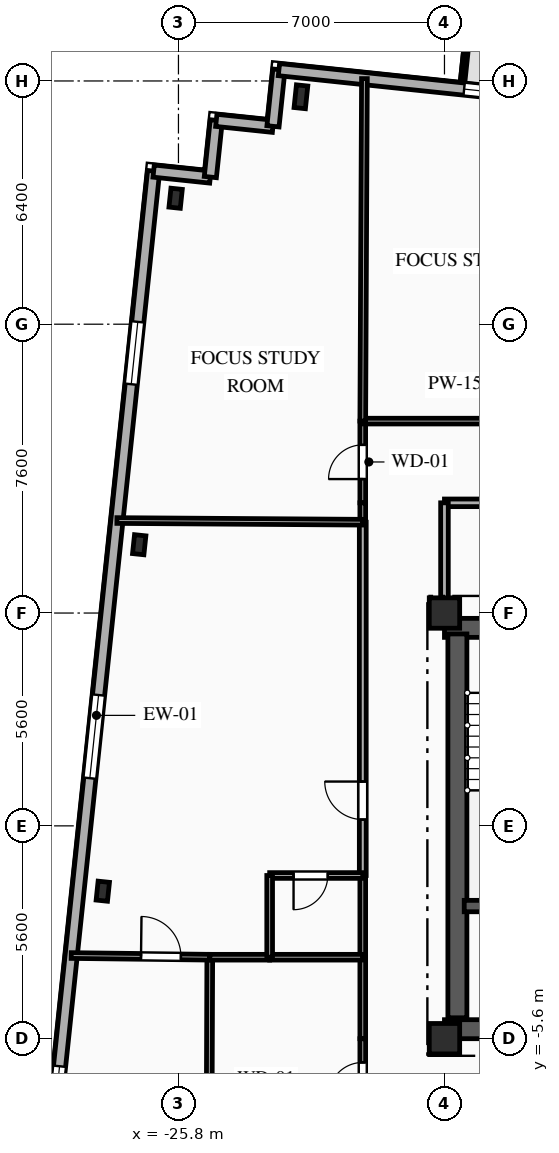
"""IFC4 building model, lengths in metres.
Left out: names, types, materials, properties, quantities, classifications, styles, units other than length and angle.
Written with IfcOpenShell. Run it as: python <this file> out.ifc"""

import sys

from ifc_helpers import new_model, si_unit, direction, frame, frame_2d, origin, origin_2d, place, context, subcontext, project, spatial, rectangle, i_section, extrude, element, fill, save


model = new_model("IFC4")
c1 = context("Model", 3, precision=1e-05, world=origin(), true_north=direction((0.0, 1.0)))
c2 = subcontext(c1, "Body", "Model", "MODEL_VIEW")
j1 = project(units=[si_unit("LENGTHUNIT", "METRE"), si_unit("PLANEANGLEUNIT", "RADIAN")], contexts=[c1])
p1 = place(None, origin())
s1 = spatial("IfcSite", under=j1, at=p1, CompositionType="ELEMENT")
p2 = place(p1, origin())
s2 = spatial("IfcBuilding", under=s1, at=p2, CompositionType="ELEMENT")
p3 = place(p2, frame((0.0, 0.0, 219.85)))
s3 = spatial("IfcBuildingStorey", under=s2, at=p3, CompositionType="ELEMENT", Elevation=219.85)
for number, where, z_axis, x_axis in (
    (1, (-18.8, -5.6, 0.0), (0.0, 0.0, 1.0), (1.0, 0.0, 0.0)),
    (2, (-18.8, 5.6, 0.0), (0.0, 0.0, 1.0), (1.0, 0.0, 0.0)),
):
    element("IfcColumn", number, at=place(p3, frame(where, z_axis=z_axis, x_axis=x_axis)), inside=s3, PredefinedType="COLUMN", context=c2, shape_type="SweptSolid", body=[
        extrude(rectangle(XDim=0.8, YDim=0.8, at=origin_2d()), origin(), (0.0, 0.0, 1.0), 3.35),
    ])
p4 = place(p3, frame((-22.577, 19.184, 0.0), z_axis=(0.0, 0.0, 1.0), x_axis=(0.994521895368, -0.104528463268, 0.0)))
e3 = element("IfcColumn", 3, at=p4, inside=s3, PredefinedType="COLUMN", context=c2, shape_type="SweptSolid", body=[
    extrude(i_section(OverallWidth=0.3, OverallDepth=0.6, WebThickness=0.015, FlangeThickness=0.03, FilletRadius=0.027, at=origin_2d()), origin(), (0.0, 0.0, 1.0), 3.35),
])
for number, where, z_axis, x_axis in (
    (4, (-25.875, 16.514, 0.0), (0.0, 0.0, 1.0), (0.995, -0.105, 0.0)),
    (5, (-26.833, 7.398, 0.0), (0.0, 0.0, 1.0), (0.995, -0.105, 0.0)),
    (6, (-27.791, -1.719, 0.0), (0.0, 0.0, 1.0), (0.995, -0.105, 0.0)),
):
    element("IfcColumn", number, at=place(p3, frame(where, z_axis=z_axis, x_axis=x_axis)), inside=s3, PredefinedType="COLUMN", context=c2, shape_type="SweptSolid", body=[
        extrude(i_section(OverallWidth=0.3, OverallDepth=0.5, WebThickness=0.014, FlangeThickness=0.028, FilletRadius=0.027, at=origin_2d()), origin(), (0.0, 0.0, 1.0), 3.35),
    ])
p5 = place(p3, frame((-29.463, -11.414, 0.0), z_axis=(0.0, 0.0, 1.0), x_axis=(0.104530779244, 0.994521651947, 0.0)))
e7 = element("IfcWall", 7, at=p5, inside=s3, PredefinedType="SOLIDWALL", context=c2, shape_type="SweptSolid", body=[
    extrude(rectangle(XDim=28.8, YDim=0.32, at=frame_2d((14.4, 0.0))), origin(), (0.0, 0.0, 1.0), 3.0),
])
p6 = place(p5, frame((3.467, 0.0, 0.85)))
e8 = element("IfcOpeningElement", 8, at=p6, cuts=e7, PredefinedType="OPENING", context=c2, shape_type="SweptSolid", body=[
    extrude(rectangle(XDim=1.65, YDim=1.85, at=frame_2d((0.825, 0.925))), frame((0.0, 0.17, 0.0), z_axis=(0.0, -1.0, 0.0), x_axis=(1.0, 0.0, 0.0)), (0.0, 0.0, 1.0), 0.34),
])
p7 = place(p5, frame((12.738, 0.0, 0.85)))
e9 = element("IfcOpeningElement", 9, at=p7, cuts=e7, PredefinedType="OPENING", context=c2, shape_type="SweptSolid", body=[
    extrude(rectangle(XDim=2.2, YDim=1.85, at=frame_2d((1.1, 0.925))), frame((0.0, 0.17, 0.0), z_axis=(0.0, -1.0, 0.0), x_axis=(1.0, 0.0, 0.0)), (0.0, 0.0, 1.0), 0.34),
])
p8 = place(p5, frame((23.162, 0.0, 0.85)))
e10 = element("IfcOpeningElement", 10, at=p8, cuts=e7, PredefinedType="OPENING", context=c2, shape_type="SweptSolid", body=[
    extrude(rectangle(XDim=1.65, YDim=1.85, at=frame_2d((0.825, 0.925))), frame((0.0, 0.17, 0.0), z_axis=(0.0, -1.0, 0.0), x_axis=(1.0, 0.0, 0.0)), (0.0, 0.0, 1.0), 0.34),
])
p9 = place(p3, frame((-26.453, 17.229, 0.0), z_axis=(0.0, 0.0, 1.0), x_axis=(0.994508128223, -0.104659366031, 0.0)))
e11 = element("IfcWall", 11, at=p9, inside=s3, PredefinedType="SOLIDWALL", context=c2, shape_type="SweptSolid", body=[
    extrude(rectangle(XDim=1.5, YDim=0.32, at=frame_2d((0.75, 0.0))), origin(), (0.0, 0.0, 1.0), 3.0),
])
p10 = place(p3, frame((-24.961, 17.072, 0.0), z_axis=(0.0, 0.0, 1.0), x_axis=(0.104642427191, 0.994509910675, 0.0)))
e12 = element("IfcWall", 12, at=p10, inside=s3, PredefinedType="SOLIDWALL", context=c2, shape_type="SweptSolid", body=[
    extrude(rectangle(XDim=1.5, YDim=0.32, at=frame_2d((0.75, 0.0))), origin(), (0.0, 0.0, 1.0), 3.0),
])
p11 = place(p3, frame((-24.804, 18.563, 0.0), z_axis=(0.0, 0.0, 1.0), x_axis=(0.994508128223, -0.104659366031, 0.0)))
e13 = element("IfcWall", 13, at=p11, inside=s3, PredefinedType="SOLIDWALL", context=c2, shape_type="SweptSolid", body=[
    extrude(rectangle(XDim=1.5, YDim=0.32, at=frame_2d((0.75, 0.0))), origin(), (0.0, 0.0, 1.0), 3.0),
])
p12 = place(p3, frame((-23.312, 18.406, 0.0), z_axis=(0.0, 0.0, 1.0), x_axis=(0.104481464157, 0.994526834051, 0.0)))
e14 = element("IfcWall", 14, at=p12, inside=s3, PredefinedType="SOLIDWALL", context=c2, shape_type="SweptSolid", body=[
    extrude(rectangle(XDim=1.5, YDim=0.32, at=frame_2d((0.75, 0.0))), origin(), (0.0, 0.0, 1.0), 3.0),
])
p13 = place(p3, frame((-23.156, 19.898, 0.0), z_axis=(0.0, 0.0, 1.0), x_axis=(0.994522001802, -0.104527450613, 0.0)))
e15 = element("IfcWall", 15, at=p13, inside=s3, PredefinedType="SOLIDWALL", context=c2, shape_type="SweptSolid", body=[
    extrude(rectangle(XDim=45.8, YDim=0.32, at=frame_2d((22.9, 0.0))), origin(), (0.0, 0.0, 1.0), 3.0),
])
p14 = place(p13, frame((4.9, 0.0, 0.85)))
e16 = element("IfcOpeningElement", 16, at=p14, cuts=e15, PredefinedType="OPENING", context=c2, shape_type="SweptSolid", body=[
    extrude(rectangle(XDim=1.65, YDim=1.85, at=frame_2d((0.825, 0.925))), frame((0.0, 0.17, 0.0), z_axis=(0.0, -1.0, 0.0), x_axis=(1.0, 0.0, 0.0)), (0.0, 0.0, 1.0), 0.34),
])
p15 = place(p13, frame((11.706, 0.0, 0.85)))
e17 = element("IfcOpeningElement", 17, at=p15, cuts=e15, PredefinedType="OPENING", context=c2, shape_type="SweptSolid", body=[
    extrude(rectangle(XDim=1.65, YDim=1.85, at=frame_2d((0.825, 0.925))), frame((0.0, 0.17, 0.0), z_axis=(0.0, -1.0, 0.0), x_axis=(1.0, 0.0, 0.0)), (0.0, 0.0, 1.0), 0.34),
])
p16 = place(p13, frame((23.431, 0.0, 0.85)))
e18 = element("IfcOpeningElement", 18, at=p16, cuts=e15, PredefinedType="OPENING", context=c2, shape_type="SweptSolid", body=[
    extrude(rectangle(XDim=1.5, YDim=1.85, at=frame_2d((0.75, 0.925))), frame((0.0, 0.17, 0.0), z_axis=(0.0, -1.0, 0.0), x_axis=(1.0, 0.0, 0.0)), (0.0, 0.0, 1.0), 0.34),
])
p17 = place(p13, frame((34.628, 0.0, 0.85)))
e19 = element("IfcOpeningElement", 19, at=p17, cuts=e15, PredefinedType="OPENING", context=c2, shape_type="SweptSolid", body=[
    extrude(rectangle(XDim=1.65, YDim=1.85, at=frame_2d((0.825, 0.925))), frame((0.0, 0.17, 0.0), z_axis=(0.0, -1.0, 0.0), x_axis=(1.0, 0.0, 0.0)), (0.0, 0.0, 1.0), 0.34),
])
p18 = place(p3, frame((-18.8, 5.21, 0.0), z_axis=(0.0, 0.0, 1.0), x_axis=(1.0, 0.0, 0.0)))
e20 = element("IfcWall", 20, at=p18, inside=s3, PredefinedType="SHEAR", context=c2, shape_type="SweptSolid", body=[
    extrude(rectangle(XDim=9.6, YDim=0.5, at=frame_2d((4.8, 0.0))), origin(), (0.0, 0.0, 1.0), 3.0),
])
p19 = place(p18, frame((1.55, 0.0, 0.0)))
e21 = element("IfcOpeningElement", 21, at=p19, cuts=e20, PredefinedType="OPENING", context=c2, shape_type="SweptSolid", body=[
    extrude(rectangle(XDim=1.1, YDim=2.15, at=frame_2d((0.55, 1.075))), frame((0.0, 0.26, 0.0), z_axis=(0.0, -1.0, 0.0), x_axis=(1.0, 0.0, 0.0)), (0.0, 0.0, 1.0), 0.52),
])
p20 = place(p18, frame((4.775, 0.0, 0.0)))
e22 = element("IfcOpeningElement", 22, at=p20, cuts=e20, PredefinedType="OPENING", context=c2, shape_type="SweptSolid", body=[
    extrude(rectangle(XDim=1.05, YDim=2.1, at=frame_2d((0.525, 1.05))), frame((0.0, 0.26, 0.0), z_axis=(0.0, -1.0, 0.0), x_axis=(1.0, 0.0, 0.0)), (0.0, 0.0, 1.0), 0.52),
])
p21 = place(p3, frame((-18.8, -5.35, 0.0), z_axis=(0.0, 0.0, 1.0), x_axis=(1.0, 0.0, 0.0)))
e23 = element("IfcWall", 23, at=p21, inside=s3, PredefinedType="SHEAR", context=c2, shape_type="SweptSolid", body=[
    extrude(rectangle(XDim=9.6, YDim=0.5, at=frame_2d((4.8, 0.0))), origin(), (0.0, 0.0, 1.0), 3.0),
])
p22 = place(p21, frame((1.05, 0.0, 0.0)))
e24 = element("IfcOpeningElement", 24, at=p22, cuts=e23, PredefinedType="OPENING", context=c2, shape_type="SweptSolid", body=[
    extrude(rectangle(XDim=0.9, YDim=2.1, at=frame_2d((0.45, 1.05))), frame((0.0, 0.26, 0.0), z_axis=(0.0, -1.0, 0.0), x_axis=(1.0, 0.0, 0.0)), (0.0, 0.0, 1.0), 0.52),
])
p23 = place(p3, frame((-18.46, -5.05, 0.0), z_axis=(0.0, 0.0, 1.0), x_axis=(0.0, 1.0, 0.0)))
e25 = element("IfcWall", 25, at=p23, inside=s3, PredefinedType="SHEAR", context=c2, shape_type="SweptSolid", body=[
    extrude(rectangle(XDim=10.1, YDim=0.5, at=frame_2d((5.05, 0.0))), origin(), (0.0, 0.0, 1.0), 3.0),
])
p24 = place(p3, frame((-18.28, -2.11, 0.0), z_axis=(0.0, 0.0, 1.0), x_axis=(1.0, 0.0, 0.0)))
e26 = element("IfcWall", 26, at=p24, inside=s3, PredefinedType="SHEAR", context=c2, shape_type="SweptSolid", body=[
    extrude(rectangle(XDim=3.18, YDim=0.3, at=frame_2d((1.59, 0.0))), origin(), (0.0, 0.0, 1.0), 3.0),
])
p25 = place(p3, frame((-12.0, 8.5, 0.0), z_axis=(0.0, 0.0, 1.0), x_axis=(-1.0, 0.0, 0.0)))
e27 = element("IfcWall", 27, at=p25, inside=s3, PredefinedType="PARTITIONING", context=c2, shape_type="SweptSolid", body=[
    extrude(rectangle(XDim=6.8, YDim=0.2, at=frame_2d((3.4, 0.0))), origin(), (0.0, 0.0, 1.0), 3.0),
])
p26 = place(p25, frame((1.715, 0.0, 0.0)))
e28 = element("IfcOpeningElement", 28, at=p26, cuts=e27, PredefinedType="OPENING", context=c2, shape_type="SweptSolid", body=[
    extrude(rectangle(XDim=1.1, YDim=2.15, at=frame_2d((0.55, 1.075))), frame((0.0, 0.11, 0.0), z_axis=(0.0, -1.0, 0.0), x_axis=(1.0, 0.0, 0.0)), (0.0, 0.0, 1.0), 0.22),
])
p27 = place(p3, frame((-18.8, 8.5, 0.0), z_axis=(0.0, 0.0, 1.0), x_axis=(0.0, -1.0, 0.0)))
e29 = element("IfcWall", 29, at=p27, inside=s3, PredefinedType="PARTITIONING", context=c2, shape_type="SweptSolid", body=[
    extrude(rectangle(XDim=2.9, YDim=0.2, at=frame_2d((1.45, 0.0))), origin(), (0.0, 0.0, 1.0), 2.625),
])
p28 = place(p3, frame((-20.95, 8.5, 0.0), z_axis=(0.0, 0.0, 1.0), x_axis=(0.0, 1.0, 0.0)))
e30 = element("IfcWall", 30, at=p28, inside=s3, PredefinedType="PARTITIONING", context=c2, shape_type="SweptSolid", body=[
    extrude(rectangle(XDim=2.15, YDim=0.15, at=frame_2d((1.075, 0.0))), origin(), (0.0, 0.0, 1.0), 3.0),
])
p29 = place(p28, frame((0.625, 0.0, 0.0)))
e31 = element("IfcOpeningElement", 31, at=p29, cuts=e30, PredefinedType="OPENING", context=c2, shape_type="SweptSolid", body=[
    extrude(rectangle(XDim=0.9, YDim=2.1, at=frame_2d((0.45, 1.05))), frame((0.0, 0.085, 0.0), z_axis=(0.0, -1.0, 0.0), x_axis=(1.0, 0.0, 0.0)), (0.0, 0.0, 1.0), 0.17),
])
p30 = place(p3, frame((-20.95, 10.65, 0.0), z_axis=(0.0, 0.0, 1.0), x_axis=(1.0, 0.0, 0.0)))
e32 = element("IfcWall", 32, at=p30, inside=s3, PredefinedType="PARTITIONING", context=c2, shape_type="SweptSolid", body=[
    extrude(rectangle(XDim=6.783, YDim=0.15, at=frame_2d((3.392, 0.0))), origin(), (0.0, 0.0, 1.0), 3.0),
])
p31 = place(p30, frame((4.582, 0.0, 0.0)))
e33 = element("IfcOpeningElement", 33, at=p31, cuts=e32, PredefinedType="OPENING", context=c2, shape_type="SweptSolid", body=[
    extrude(rectangle(XDim=1.05, YDim=2.15, at=frame_2d((0.525, 1.075))), frame((0.0, 0.085, 0.0), z_axis=(0.0, -1.0, 0.0), x_axis=(1.0, 0.0, 0.0)), (0.0, 0.0, 1.0), 0.17),
])
p32 = place(p3, frame((-20.95, -7.75, 0.0), z_axis=(0.0, 0.0, 1.0), x_axis=(0.0, 1.0, 0.0)))
e34 = element("IfcWall", 34, at=p32, inside=s3, PredefinedType="PARTITIONING", context=c2, shape_type="SweptSolid", body=[
    extrude(rectangle(XDim=2.15, YDim=0.15, at=frame_2d((1.075, 0.0))), origin(), (0.0, 0.0, 1.0), 3.0),
])
p33 = place(p32, frame((0.625, 0.0, 0.0)))
e35 = element("IfcOpeningElement", 35, at=p33, cuts=e34, PredefinedType="OPENING", context=c2, shape_type="SweptSolid", body=[
    extrude(rectangle(XDim=0.9, YDim=2.1, at=frame_2d((0.45, 1.05))), frame((0.0, 0.085, 0.0), z_axis=(0.0, -1.0, 0.0), x_axis=(1.0, 0.0, 0.0)), (0.0, 0.0, 1.0), 0.17),
])
p34 = place(p3, frame((-20.95, -5.6, 0.0), z_axis=(0.0, 0.0, 1.0), x_axis=(0.0, 1.0, 0.0)))
e36 = element("IfcWall", 36, at=p34, inside=s3, PredefinedType="PARTITIONING", context=c2, shape_type="SweptSolid", body=[
    extrude(rectangle(XDim=2.144, YDim=0.15, at=frame_2d((1.072, 0.0))), origin(), (0.0, 0.0, 1.0), 3.0),
])
p35 = place(p3, frame((-20.95, -1.306, 0.0), z_axis=(0.0, 0.0, 1.0), x_axis=(0.0, 1.0, 0.0)))
e37 = element("IfcWall", 37, at=p35, inside=s3, PredefinedType="PARTITIONING", context=c2, shape_type="SweptSolid", body=[
    extrude(rectangle(XDim=9.296, YDim=0.18, at=frame_2d((4.648, 0.0))), origin(), (0.0, 0.0, 1.0), 3.0),
])
p36 = place(p35, frame((1.472, 0.0, 0.0)))
e38 = element("IfcOpeningElement", 38, at=p36, cuts=e37, PredefinedType="OPENING", context=c2, shape_type="SweptSolid", body=[
    extrude(rectangle(XDim=1.0, YDim=2.15, at=frame_2d((0.5, 1.075))), frame((0.0, 0.1, 0.0), z_axis=(0.0, -1.0, 0.0), x_axis=(1.0, 0.0, 0.0)), (0.0, 0.0, 1.0), 0.2),
])
p37 = place(p3, frame((-20.95, -3.456, 0.0), z_axis=(0.0, 0.0, 1.0), x_axis=(0.0, 1.0, 0.0)))
e39 = element("IfcWall", 39, at=p37, inside=s3, PredefinedType="PLUMBINGWALL", context=c2, shape_type="SweptSolid", body=[
    extrude(rectangle(XDim=2.15, YDim=0.15, at=frame_2d((1.075, 0.0))), origin(), (0.0, 0.0, 1.0), 3.0),
])
p38 = place(p3, frame((-20.95, 7.99, 0.0), z_axis=(0.0, 0.0, 1.0), x_axis=(0.0, 1.0, 0.0)))
e40 = element("IfcWall", 40, at=p38, inside=s3, PredefinedType="PARTITIONING", context=c2, shape_type="SweptSolid", body=[
    extrude(rectangle(XDim=0.51, YDim=0.15, at=frame_2d((0.255, 0.0))), origin(), (0.0, 0.0, 1.0), 3.0),
])
p39 = place(p3, frame((-24.976, -3.456, 0.0), z_axis=(0.0, 0.0, 1.0), x_axis=(-0.003840873, -0.99999262382, 0.0)))
e41 = element("IfcWall", 41, at=p39, inside=s3, PredefinedType="PARTITIONING", context=c2, shape_type="SweptSolid", body=[
    extrude(rectangle(XDim=11.441, YDim=0.15, at=frame_2d((5.721, 0.0))), origin(), (0.0, 0.0, 1.0), 3.0),
])
p40 = place(p3, frame((-28.622, -3.412, 0.0), z_axis=(0.0, 0.0, 1.0), x_axis=(0.999927389555, -0.01205054433, 0.0)))
e42 = element("IfcWall", 42, at=p40, inside=s3, PredefinedType="PARTITIONING", context=c2, shape_type="SweptSolid", body=[
    extrude(rectangle(XDim=3.647, YDim=0.15, at=frame_2d((1.823, 0.0))), origin(), (0.0, 0.0, 1.0), 3.0),
])
p41 = place(p40, frame((1.837, 0.0, 0.0)))
e43 = element("IfcOpeningElement", 43, at=p41, cuts=e42, PredefinedType="OPENING", context=c2, shape_type="SweptSolid", body=[
    extrude(rectangle(XDim=1.05, YDim=2.15, at=frame_2d((0.525, 1.075))), frame((0.0, 0.085, 0.0), z_axis=(0.0, -1.0, 0.0), x_axis=(1.0, 0.0, 0.0)), (0.0, 0.0, 1.0), 0.17),
])
p42 = place(p3, frame((-24.976, -3.456, 0.0), z_axis=(0.0, 0.0, 1.0), x_axis=(1.0, 0.0, 0.0)))
e44 = element("IfcWall", 44, at=p42, inside=s3, PredefinedType="PARTITIONING", context=c2, shape_type="SweptSolid", body=[
    extrude(rectangle(XDim=1.576, YDim=0.15, at=frame_2d((0.788, 0.0))), origin(), (0.0, 0.0, 1.0), 3.0),
])
p43 = place(p3, frame((-23.4, -3.456, 0.0), z_axis=(0.0, 0.0, 1.0), x_axis=(1.0, 0.0, 0.0)))
e45 = element("IfcWall", 45, at=p43, inside=s3, PredefinedType="PLUMBINGWALL", context=c2, shape_type="SweptSolid", body=[
    extrude(rectangle(XDim=2.45, YDim=0.15, at=frame_2d((1.225, 0.0))), origin(), (0.0, 0.0, 1.0), 3.0),
])
p44 = place(p3, frame((-20.95, -1.306, 0.0), z_axis=(0.0, 0.0, 1.0), x_axis=(-1.0, 0.0, 0.0)))
e46 = element("IfcWall", 46, at=p44, inside=s3, PredefinedType="PLUMBINGWALL", context=c2, shape_type="SweptSolid", body=[
    extrude(rectangle(XDim=2.45, YDim=0.15, at=frame_2d((1.225, 0.0))), origin(), (0.0, 0.0, 1.0), 3.0),
])
p45 = place(p44, frame((0.921, 0.0, 0.0)))
e47 = element("IfcOpeningElement", 47, at=p45, cuts=e46, PredefinedType="OPENING", context=c2, shape_type="SweptSolid", body=[
    extrude(rectangle(XDim=0.9, YDim=2.1, at=frame_2d((0.45, 1.05))), frame((0.0, 0.085, 0.0), z_axis=(0.0, -1.0, 0.0), x_axis=(1.0, 0.0, 0.0)), (0.0, 0.0, 1.0), 0.17),
])
p46 = place(p3, frame((-23.4, -1.306, 0.0), z_axis=(0.0, 0.0, 1.0), x_axis=(0.0, -1.0, 0.0)))
e48 = element("IfcWall", 48, at=p46, inside=s3, PredefinedType="PLUMBINGWALL", context=c2, shape_type="SweptSolid", body=[
    extrude(rectangle(XDim=2.15, YDim=0.15, at=frame_2d((1.075, 0.0))), origin(), (0.0, 0.0, 1.0), 2.655),
])
p47 = place(p3, frame((-27.419, 8.034, 0.0), z_axis=(0.0, 0.0, 1.0), x_axis=(0.999976928608, -0.006792808784, 0.0)))
e49 = element("IfcWall", 49, at=p47, inside=s3, PredefinedType="PARTITIONING", context=c2, shape_type="SweptSolid", body=[
    extrude(rectangle(XDim=6.469, YDim=0.15, at=frame_2d((3.235, 0.0))), origin(), (0.0, 0.0, 1.0), 3.0),
])
p48 = place(p3, frame((-20.906, 19.662, 0.0), z_axis=(0.0, 0.0, 1.0), x_axis=(-0.004876272857, -0.999988110911, 0.0)))
e50 = element("IfcWall", 50, at=p48, inside=s3, PredefinedType="PARTITIONING", context=c2, shape_type="SweptSolid", body=[
    extrude(rectangle(XDim=9.012, YDim=0.15, at=frame_2d((4.506, 0.0))), origin(), (0.0, 0.0, 1.0), 2.625),
])
p49 = place(p6, origin())
e51 = element("IfcWindow", 51, at=p49, inside=s3, PartitioningType="SINGLE_PANEL", PredefinedType="WINDOW", context=c2, shape_type="SweptSolid", body=[
    extrude(rectangle(XDim=1.65, YDim=1.85, at=frame_2d((0.825, 0.925))), frame((0.0, 0.03, 0.0), z_axis=(0.0, -1.0, 0.0), x_axis=(1.0, 0.0, 0.0)), (0.0, 0.0, 1.0), 0.06),
])
fill(e8, e51)
p50 = place(p7, origin())
e52 = element("IfcWindow", 52, at=p50, inside=s3, PartitioningType="SINGLE_PANEL", PredefinedType="WINDOW", context=c2, shape_type="SweptSolid", body=[
    extrude(rectangle(XDim=2.2, YDim=1.85, at=frame_2d((1.1, 0.925))), frame((0.0, 0.03, 0.0), z_axis=(0.0, -1.0, 0.0), x_axis=(1.0, 0.0, 0.0)), (0.0, 0.0, 1.0), 0.06),
])
fill(e9, e52)
p51 = place(p8, origin())
e53 = element("IfcWindow", 53, at=p51, inside=s3, PartitioningType="SINGLE_PANEL", PredefinedType="WINDOW", context=c2, shape_type="SweptSolid", body=[
    extrude(rectangle(XDim=1.65, YDim=1.85, at=frame_2d((0.825, 0.925))), frame((0.0, 0.03, 0.0), z_axis=(0.0, -1.0, 0.0), x_axis=(1.0, 0.0, 0.0)), (0.0, 0.0, 1.0), 0.06),
])
fill(e10, e53)
p52 = place(p14, origin())
e54 = element("IfcWindow", 54, at=p52, inside=s3, PartitioningType="SINGLE_PANEL", PredefinedType="WINDOW", context=c2, shape_type="SweptSolid", body=[
    extrude(rectangle(XDim=1.65, YDim=1.85, at=frame_2d((0.825, 0.925))), frame((0.0, 0.03, 0.0), z_axis=(0.0, -1.0, 0.0), x_axis=(1.0, 0.0, 0.0)), (0.0, 0.0, 1.0), 0.06),
])
fill(e16, e54)
p53 = place(p29, origin())
e55 = element("IfcDoor", 55, at=p53, inside=s3, OperationType="SINGLE_SWING_LEFT", PredefinedType="DOOR", context=c2, shape_type="SweptSolid", body=[
    extrude(rectangle(XDim=0.9, YDim=2.1, at=frame_2d((0.45, 1.05))), frame((0.0, 0.025, 0.0), z_axis=(0.0, -1.0, 0.0), x_axis=(1.0, 0.0, 0.0)), (0.0, 0.0, 1.0), 0.05),
])
fill(e31, e55)
p54 = place(p33, origin())
e56 = element("IfcDoor", 56, at=p54, inside=s3, OperationType="SINGLE_SWING_LEFT", PredefinedType="DOOR", context=c2, shape_type="SweptSolid", body=[
    extrude(rectangle(XDim=0.9, YDim=2.1, at=frame_2d((0.45, 1.05))), frame((0.0, 0.025, 0.0), z_axis=(0.0, -1.0, 0.0), x_axis=(1.0, 0.0, 0.0)), (0.0, 0.0, 1.0), 0.05),
])
fill(e35, e56)
p55 = place(p36, origin())
e57 = element("IfcDoor", 57, at=p55, inside=s3, OperationType="SINGLE_SWING_RIGHT", PredefinedType="DOOR", context=c2, shape_type="SweptSolid", body=[
    extrude(rectangle(XDim=1.0, YDim=2.15, at=frame_2d((0.5, 1.075))), frame((0.0, 0.025, 0.0), z_axis=(0.0, -1.0, 0.0), x_axis=(1.0, 0.0, 0.0)), (0.0, 0.0, 1.0), 0.05),
])
fill(e38, e57)
p56 = place(p41, origin())
e58 = element("IfcDoor", 58, at=p56, inside=s3, OperationType="SINGLE_SWING_LEFT", PredefinedType="DOOR", context=c2, shape_type="SweptSolid", body=[
    extrude(rectangle(XDim=1.05, YDim=2.15, at=frame_2d((0.525, 1.075))), frame((0.0, 0.025, 0.0), z_axis=(0.0, -1.0, 0.0), x_axis=(1.0, 0.0, 0.0)), (0.0, 0.0, 1.0), 0.05),
])
fill(e43, e58)
p57 = place(p45, origin())
e59 = element("IfcDoor", 59, at=p57, inside=s3, OperationType="SINGLE_SWING_RIGHT", PredefinedType="DOOR", context=c2, shape_type="SweptSolid", body=[
    extrude(rectangle(XDim=0.9, YDim=2.1, at=frame_2d((0.45, 1.05))), frame((0.0, 0.025, 0.0), z_axis=(0.0, -1.0, 0.0), x_axis=(1.0, 0.0, 0.0)), (0.0, 0.0, 1.0), 0.05),
])
fill(e47, e59)
save(model, sys.argv[1])
